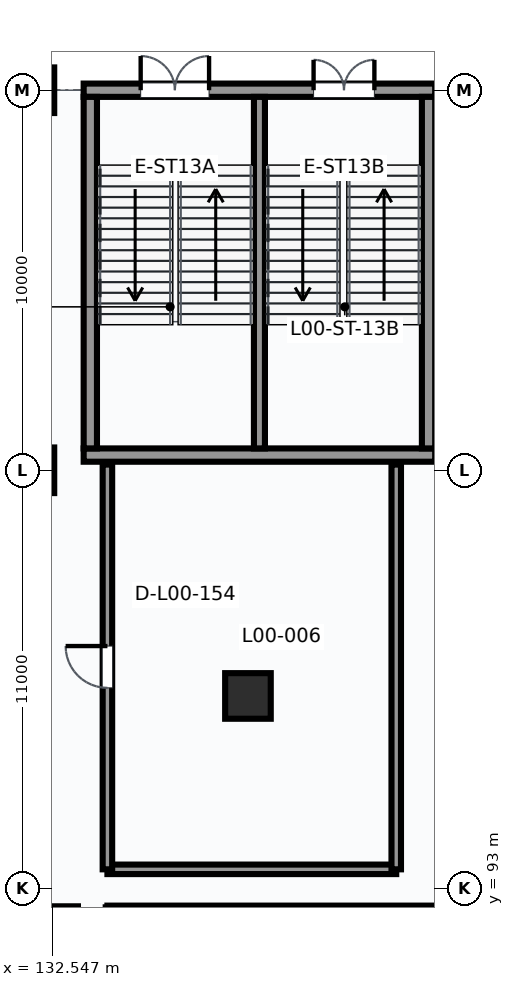
"""IFC4 building model, lengths in metres.
Left out: names, types, materials, properties, quantities, classifications, styles, units other than length and angle.
Written with IfcOpenShell. Run it as: python <this file> out.ifc"""

import sys

from ifc_helpers import new_model, si_unit, direction, frame, frame_2d, origin, origin_2d, place, context, subcontext, project, spatial, rectangle, extrude, element, fill, save


model = new_model("IFC4")
c1 = context("Model", 3, precision=1e-05, world=origin(), true_north=direction((0.0, 1.0)))
c2 = subcontext(c1, "Body", "Model", "MODEL_VIEW")
j1 = project(units=[si_unit("LENGTHUNIT", "METRE"), si_unit("PLANEANGLEUNIT", "RADIAN")], contexts=[c1])
p1 = place(None, origin())
s1 = spatial("IfcSite", under=j1, at=p1, CompositionType="ELEMENT")
p2 = place(p1, origin())
s2 = spatial("IfcBuilding", under=s1, at=p2, CompositionType="ELEMENT")
p3 = place(p2, origin())
s3 = spatial("IfcBuildingStorey", under=s2, at=p3, CompositionType="ELEMENT", Elevation=0.0)
for number, where, z_axis, x_axis in (
    (1, (132.0, 104.0, 0.0), (0.0, 0.0, 1.0), (1.0, 0.0, 0.0)),
    (2, (132.0, 114.0, 0.0), (0.0, 0.0, 1.0), (1.0, 0.0, 0.0)),
):
    element("IfcColumn", number, at=place(p3, frame(where, z_axis=z_axis, x_axis=x_axis)), inside=s3, PredefinedType="COLUMN", context=c2, shape_type="SweptSolid", body=[
        extrude(rectangle(XDim=1.2, YDim=1.2, at=origin_2d()), origin(), (0.0, 0.0, 1.0), 5.4),
    ])
p4 = place(p3, frame((132.749, 92.052, 0.0), z_axis=(0.0, 0.0, 1.0), x_axis=(1.0, 0.0, 0.0)))
e3 = element("IfcColumn", 3, at=p4, inside=s3, PredefinedType="COLUMN", context=c2, shape_type="SweptSolid", body=[
    extrude(rectangle(XDim=0.95, YDim=0.95, at=origin_2d()), origin(), (0.0, 0.0, 1.0), 5.4),
])
p5 = place(p3, frame((137.698, 98.062, 0.0), z_axis=(0.0, 0.0, 1.0), x_axis=(1.0, 0.0, 0.0)))
e4 = element("IfcColumn", 4, at=p5, inside=s3, PredefinedType="COLUMN", context=c2, shape_type="SweptSolid", body=[
    extrude(rectangle(XDim=1.2, YDim=1.2, at=origin_2d()), origin(), (0.0, 0.0, 1.0), 5.4),
])
p6 = place(p3, frame((133.375, 104.4, 0.0), z_axis=(0.0, 0.0, 1.0), x_axis=(1.0, 0.0, 0.0)))
e5 = element("IfcWall", 5, at=p6, inside=s3, PredefinedType="SHEAR", context=c2, shape_type="SweptSolid", body=[
    extrude(rectangle(XDim=9.25, YDim=0.35, at=frame_2d((4.625, 0.0))), origin(), (0.0, 0.0, 1.0), 5.4),
])
p7 = place(p3, frame((133.375, 114.0, 0.0), z_axis=(0.0, 0.0, 1.0), x_axis=(1.0, 0.0, 0.0)))
e6 = element("IfcWall", 6, at=p7, inside=s3, PredefinedType="SHEAR", context=c2, shape_type="SweptSolid", body=[
    extrude(rectangle(XDim=9.25, YDim=0.35, at=frame_2d((4.625, 0.0))), origin(), (0.0, 0.0, 1.0), 4.496),
])
p8 = place(p7, frame((1.5, 0.0, 0.0)))
e7 = element("IfcOpeningElement", 7, at=p8, cuts=e6, PredefinedType="OPENING", context=c2, shape_type="SweptSolid", body=[
    extrude(rectangle(XDim=1.8, YDim=2.2, at=frame_2d((0.9, 1.1))), frame((0.0, 0.185, 0.0), z_axis=(0.0, -1.0, 0.0), x_axis=(1.0, 0.0, 0.0)), (0.0, 0.0, 1.0), 0.37),
])
p9 = place(p7, frame((6.05, 0.0, 0.0)))
e8 = element("IfcOpeningElement", 8, at=p9, cuts=e6, PredefinedType="OPENING", context=c2, shape_type="SweptSolid", body=[
    extrude(rectangle(XDim=1.6, YDim=2.2, at=frame_2d((0.8, 1.1))), frame((0.0, 0.185, 0.0), z_axis=(0.0, -1.0, 0.0), x_axis=(1.0, 0.0, 0.0)), (0.0, 0.0, 1.0), 0.37),
])
for number, where, z_axis, x_axis in (
    (9, (133.55, 104.575, 0.0), (0.0, 0.0, 1.0), (0.0, 1.0, 0.0)),
    (10, (142.45, 104.575, 0.0), (0.0, 0.0, 1.0), (0.0, 1.0, 0.0)),
):
    element("IfcWall", number, at=place(p3, frame(where, z_axis=z_axis, x_axis=x_axis)), inside=s3, PredefinedType="SHEAR", context=c2, shape_type="SweptSolid", body=[
        extrude(rectangle(XDim=9.25, YDim=0.35, at=frame_2d((4.625, 0.0))), origin(), (0.0, 0.0, 1.0), 5.4),
    ])
p10 = place(p3, frame((138.0, 104.575, 0.0), z_axis=(0.0, 0.0, 1.0), x_axis=(0.0, 1.0, 0.0)))
e11 = element("IfcWall", 11, at=p10, inside=s3, PredefinedType="SHEAR", context=c2, shape_type="SweptSolid", body=[
    extrude(rectangle(XDim=9.25, YDim=0.29, at=frame_2d((4.625, 0.0))), origin(), (0.0, 0.0, 1.0), 5.4),
])
p11 = place(p3, frame((134.0, 92.5, 0.0), z_axis=(0.0, 0.0, 1.0), x_axis=(1.0, 0.0, 0.0)))
e12 = element("IfcWall", 12, at=p11, inside=s3, PredefinedType="PARTITIONING", context=c2, shape_type="SweptSolid", body=[
    extrude(rectangle(XDim=21.4, YDim=0.09, at=frame_2d((10.7, 0.0))), origin(), (0.0, 0.0, 1.0), 4.113),
])
p12 = place(p11, frame((12.743, 0.0, 0.0)))
e13 = element("IfcOpeningElement", 13, at=p12, cuts=e12, PredefinedType="OPENING", context=c2, shape_type="SweptSolid", body=[
    extrude(rectangle(XDim=1.05, YDim=2.2, at=frame_2d((0.525, 1.1))), frame((0.0, 0.055, 0.0), z_axis=(0.0, -1.0, 0.0), x_axis=(1.0, 0.0, 0.0)), (0.0, 0.0, 1.0), 0.11),
])
p13 = place(p3, frame((141.6, 93.5, 0.0), z_axis=(0.0, 0.0, 1.0), x_axis=(-1.0, 0.0, 0.0)))
e14 = element("IfcWall", 14, at=p13, inside=s3, PredefinedType="SOLIDWALL", context=c2, shape_type="SweptSolid", body=[
    extrude(rectangle(XDim=7.6, YDim=0.25, at=frame_2d((3.8, 0.0))), origin(), (0.0, 0.0, 1.0), 5.06),
])
p14 = place(p3, frame((134.0, 93.5, 0.0), z_axis=(0.0, 0.0, 1.0), x_axis=(0.0, 1.0, 0.0)))
e15 = element("IfcWall", 15, at=p14, inside=s3, PredefinedType="SOLIDWALL", context=c2, shape_type="SweptSolid", body=[
    extrude(rectangle(XDim=10.65, YDim=0.25, at=frame_2d((5.325, 0.0))), origin(), (0.0, 0.0, 1.0), 4.04),
])
p15 = place(p14, frame((4.775, 0.0, 0.0)))
e16 = element("IfcOpeningElement", 16, at=p15, cuts=e15, PredefinedType="OPENING", context=c2, shape_type="SweptSolid", body=[
    extrude(rectangle(XDim=1.1, YDim=2.2, at=frame_2d((0.55, 1.1))), frame((0.0, 0.135, 0.0), z_axis=(0.0, -1.0, 0.0), x_axis=(1.0, 0.0, 0.0)), (0.0, 0.0, 1.0), 0.27),
])
p16 = place(p3, frame((141.6, 104.15, 0.0), z_axis=(0.0, 0.0, 1.0), x_axis=(0.0, -1.0, 0.0)))
e17 = element("IfcWall", 17, at=p16, inside=s3, PredefinedType="SOLIDWALL", context=c2, shape_type="SweptSolid", body=[
    extrude(rectangle(XDim=10.65, YDim=0.25, at=frame_2d((5.325, 0.0))), origin(), (0.0, 0.0, 1.0), 4.04),
])
p17 = place(p8, origin())
e18 = element("IfcDoor", 18, at=p17, inside=s3, OperationType="DOUBLE_DOOR_SINGLE_SWING", PredefinedType="DOOR", context=c2, shape_type="SweptSolid", body=[
    extrude(rectangle(XDim=1.8, YDim=2.2, at=frame_2d((0.9, 1.1))), frame((0.0, 0.025, 0.0), z_axis=(0.0, -1.0, 0.0), x_axis=(1.0, 0.0, 0.0)), (0.0, 0.0, 1.0), 0.05),
])
fill(e7, e18)
p18 = place(p9, origin())
e19 = element("IfcDoor", 19, at=p18, inside=s3, OperationType="DOUBLE_DOOR_SINGLE_SWING", PredefinedType="DOOR", context=c2, shape_type="SweptSolid", body=[
    extrude(rectangle(XDim=1.6, YDim=2.2, at=frame_2d((0.8, 1.1))), frame((0.0, 0.025, 0.0), z_axis=(0.0, -1.0, 0.0), x_axis=(1.0, 0.0, 0.0)), (0.0, 0.0, 1.0), 0.05),
])
fill(e8, e19)
p19 = place(p15, origin())
e20 = element("IfcDoor", 20, at=p19, inside=s3, OperationType="SINGLE_SWING_RIGHT", PredefinedType="DOOR", context=c2, shape_type="SweptSolid", body=[
    extrude(rectangle(XDim=1.1, YDim=2.2, at=frame_2d((0.55, 1.1))), frame((0.0, 0.025, 0.0), z_axis=(0.0, -1.0, 0.0), x_axis=(1.0, 0.0, 0.0)), (0.0, 0.0, 1.0), 0.05),
])
fill(e16, e20)
save(model, sys.argv[1])
